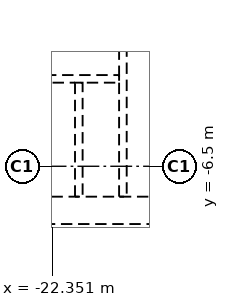
"""IFC4 building model, lengths in metres.
Left out: names, types, materials, properties, quantities, classifications, styles, units other than length and angle.
Written with IfcOpenShell. Run it as: python <this file> out.ifc"""

import sys

from ifc_helpers import new_model, si_unit, direction, frame, frame_2d, origin, place, context, subcontext, project, spatial, rectangle, extrude, element, fill, save


model = new_model("IFC4")
c1 = context("Model", 3, precision=1e-05, world=origin(), true_north=direction((0.0, 1.0)))
c2 = subcontext(c1, "Body", "Model", "MODEL_VIEW")
j1 = project(units=[si_unit("LENGTHUNIT", "METRE"), si_unit("PLANEANGLEUNIT", "RADIAN")], contexts=[c1])
p1 = place(None, origin())
s1 = spatial("IfcSite", under=j1, at=p1, CompositionType="ELEMENT")
p2 = place(p1, origin())
s2 = spatial("IfcBuilding", under=s1, at=p2, CompositionType="ELEMENT")
p3 = place(p2, frame((0.0, 0.0, 9.0)))
s3 = spatial("IfcBuildingStorey", under=s2, at=p3, CompositionType="ELEMENT", Elevation=9.0)
p4 = place(p3, frame((-32.7, -7.95, 0.0), z_axis=(0.0, 0.0, 1.0), x_axis=(1.0, 0.0, 0.0)))
e1 = element("IfcWall", 1, at=p4, inside=s3, PredefinedType="SHEAR", context=c2, shape_type="SweptSolid", body=[
    extrude(rectangle(XDim=15.0, YDim=0.9, at=frame_2d((7.5, 0.0))), origin(), (0.0, 0.0, 1.0), 5.6),
])
p5 = place(p4, frame((11.45, 0.0, 0.0)))
e2 = element("IfcOpeningElement", 2, at=p5, cuts=e1, PredefinedType="OPENING", context=c2, shape_type="SweptSolid", body=[
    extrude(rectangle(XDim=1.0, YDim=2.1, at=frame_2d((0.5, 1.05))), frame((0.0, 0.46, 0.0), z_axis=(0.0, -1.0, 0.0), x_axis=(1.0, 0.0, 0.0)), (0.0, 0.0, 1.0), 0.92),
])
p6 = place(p3, frame((-20.025, -7.5, 0.0), z_axis=(0.0, 0.0, 1.0), x_axis=(0.0, 1.0, 0.0)))
e3 = element("IfcWall", 3, at=p6, inside=s3, PredefinedType="SHEAR", context=c2, shape_type="SweptSolid", body=[
    extrude(rectangle(XDim=6.3, YDim=0.25, at=frame_2d((3.15, 0.0))), origin(), (0.0, 0.0, 1.0), 5.6),
])
p7 = place(p6, frame((2.4, 0.0, 0.0)))
e4 = element("IfcOpeningElement", 4, at=p7, cuts=e3, PredefinedType="OPENING", context=c2, shape_type="SweptSolid", body=[
    extrude(rectangle(XDim=1.0, YDim=2.1, at=frame_2d((0.5, 1.05))), frame((0.0, 0.135, 0.0), z_axis=(0.0, -1.0, 0.0), x_axis=(1.0, 0.0, 0.0)), (0.0, 0.0, 1.0), 0.27),
])
p8 = place(p3, frame((-27.65, -3.625, 0.0), z_axis=(0.0, 0.0, 1.0), x_axis=(1.0, 0.0, 0.0)))
e5 = element("IfcWall", 5, at=p8, inside=s3, PredefinedType="SHEAR", context=c2, shape_type="SweptSolid", body=[
    extrude(rectangle(XDim=7.5, YDim=0.25, at=frame_2d((3.75, 0.0))), origin(), (0.0, 0.0, 1.0), 5.6),
])
p9 = place(p3, frame((-21.475, -7.5, 0.0), z_axis=(0.0, 0.0, 1.0), x_axis=(0.0, 1.0, 0.0)))
e6 = element("IfcWall", 6, at=p9, inside=s3, PredefinedType="SHEAR", context=c2, shape_type="SweptSolid", body=[
    extrude(rectangle(XDim=3.75, YDim=0.25, at=frame_2d((1.875, 0.0))), origin(), (0.0, 0.0, 1.0), 5.6),
])
p10 = place(p9, frame((1.3, 0.0, 0.0)))
e7 = element("IfcOpeningElement", 7, at=p10, cuts=e6, PredefinedType="OPENING", context=c2, shape_type="SweptSolid", body=[
    extrude(rectangle(XDim=1.2, YDim=2.1, at=frame_2d((0.6, 1.05))), frame((0.0, 0.135, 0.0), z_axis=(0.0, -1.0, 0.0), x_axis=(1.0, 0.0, 0.0)), (0.0, 0.0, 1.0), 0.27),
])
p11 = place(p5, origin())
e8 = element("IfcDoor", 8, at=p11, inside=s3, OperationType="SINGLE_SWING_RIGHT", PredefinedType="DOOR", context=c2, shape_type="SweptSolid", body=[
    extrude(rectangle(XDim=1.0, YDim=2.1, at=frame_2d((0.5, 1.05))), frame((0.0, 0.025, 0.0), z_axis=(0.0, -1.0, 0.0), x_axis=(1.0, 0.0, 0.0)), (0.0, 0.0, 1.0), 0.05),
])
fill(e2, e8)
p12 = place(p10, origin())
e9 = element("IfcDoor", 9, at=p12, inside=s3, OperationType="DOUBLE_DOOR_SINGLE_SWING", PredefinedType="DOOR", context=c2, shape_type="SweptSolid", body=[
    extrude(rectangle(XDim=1.2, YDim=2.1, at=frame_2d((0.6, 1.05))), frame((0.0, 0.025, 0.0), z_axis=(0.0, -1.0, 0.0), x_axis=(1.0, 0.0, 0.0)), (0.0, 0.0, 1.0), 0.05),
])
fill(e7, e9)
p13 = place(p7, origin())
e10 = element("IfcDoor", 10, at=p13, inside=s3, OperationType="SINGLE_SWING_LEFT", PredefinedType="DOOR", context=c2, shape_type="SweptSolid", body=[
    extrude(rectangle(XDim=1.0, YDim=2.1, at=frame_2d((0.5, 1.05))), frame((0.0, 0.025, 0.0), z_axis=(0.0, -1.0, 0.0), x_axis=(1.0, 0.0, 0.0)), (0.0, 0.0, 1.0), 0.05),
])
fill(e4, e10)
save(model, sys.argv[1])
